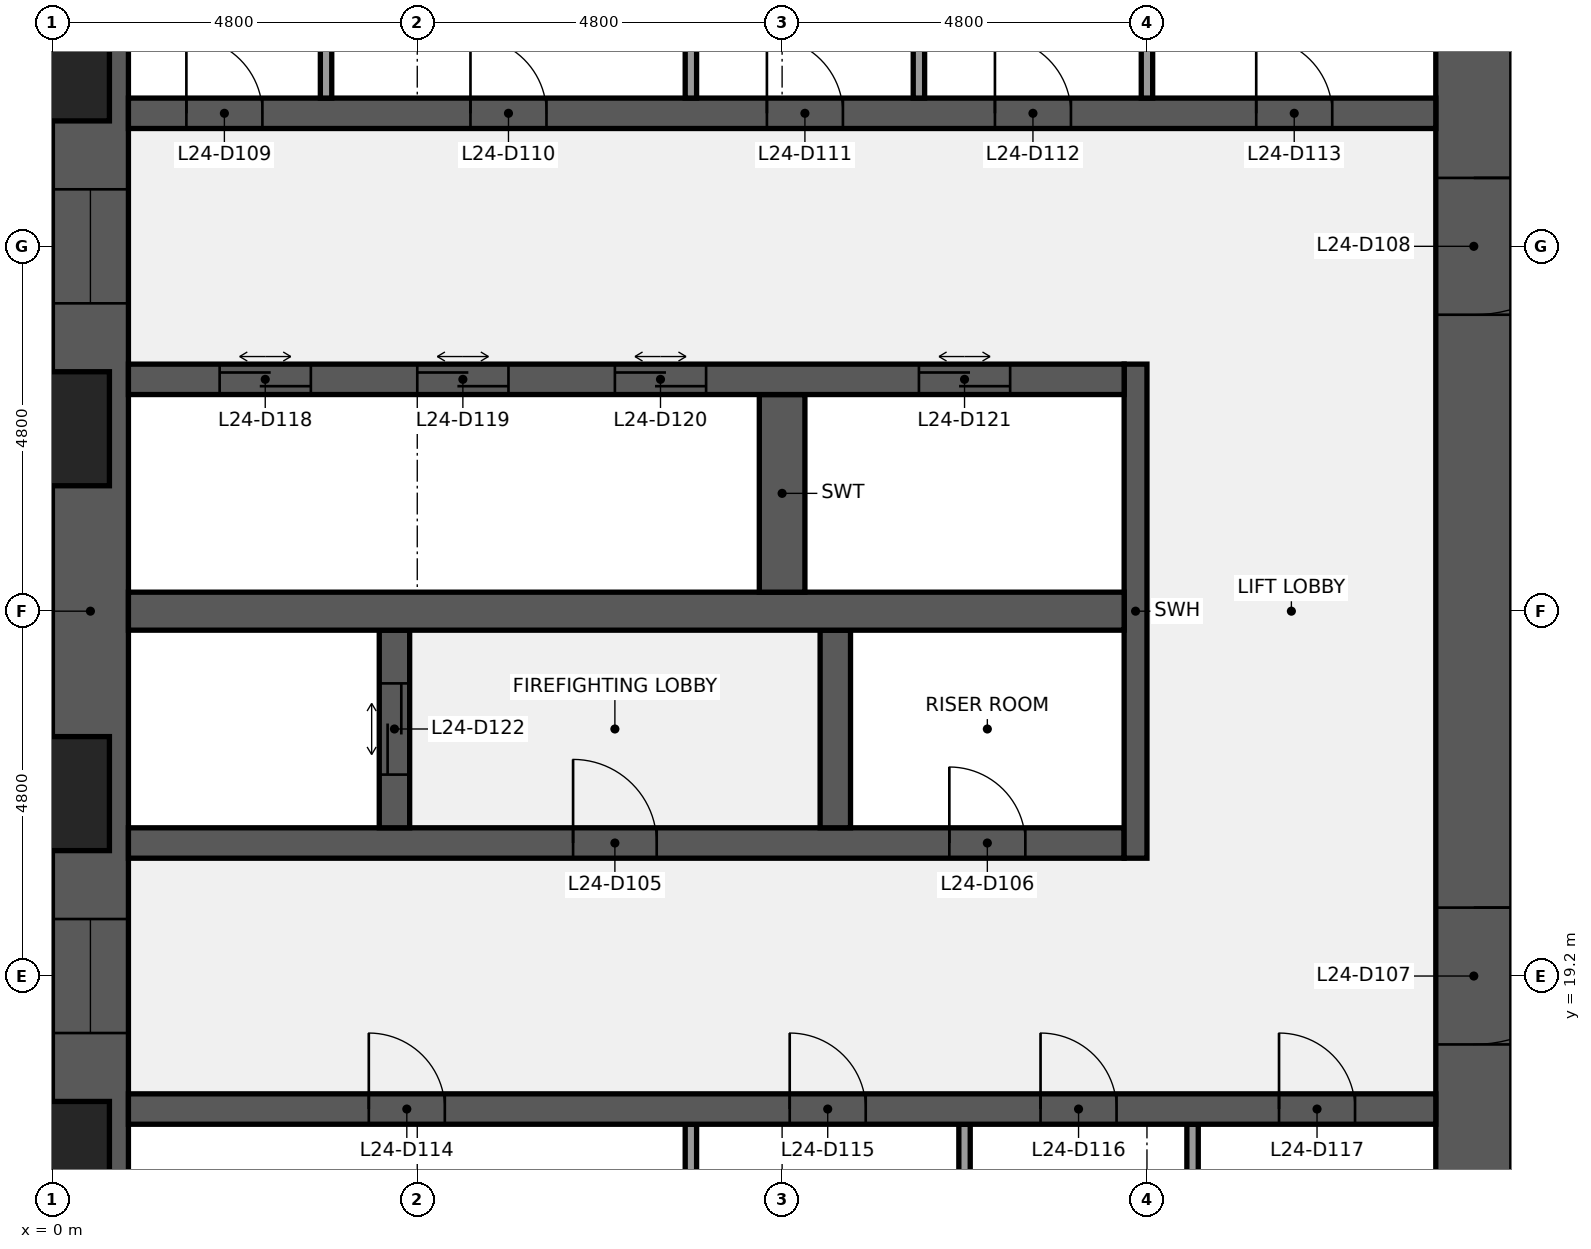
"""IFC4 building model, lengths in metres.
Left out: names, types, materials, properties, quantities, classifications, styles, units other than length and angle.
Written with IfcOpenShell. Run it as: python <this file> out.ifc"""

import sys

from ifc_helpers import new_model, si_unit, direction, frame, frame_2d, origin, place, context, subcontext, project, spatial, rectangle, extrude, element, fill, save


model = new_model("IFC4")
c1 = context("Model", 3, precision=1e-05, world=origin(), true_north=direction((0.0, 1.0)))
c2 = subcontext(c1, "Body", "Model", "MODEL_VIEW")
j1 = project(units=[si_unit("LENGTHUNIT", "METRE"), si_unit("PLANEANGLEUNIT", "RADIAN")], contexts=[c1])
p1 = place(None, origin())
s1 = spatial("IfcSite", under=j1, at=p1, CompositionType="ELEMENT")
p2 = place(p1, origin())
s2 = spatial("IfcBuilding", under=s1, at=p2, CompositionType="ELEMENT")
p3 = place(p2, frame((0.0, 0.0, 116.1)))
s3 = spatial("IfcBuildingStorey", under=s2, at=p3, CompositionType="ELEMENT", Elevation=116.1)
p4 = place(p3, frame((0.5, 9.6, 0.0), z_axis=(0.0, 0.0, 1.0), x_axis=(0.0, 1.0, 0.0)))
e1 = element("IfcWall", 1, at=p4, inside=s3, PredefinedType="SHEAR", context=c2, shape_type="SweptSolid", body=[
    extrude(rectangle(XDim=28.8, YDim=1.0, at=frame_2d((14.4, 0.0))), origin(), (0.0, 0.0, 1.0), 3.84),
])
p5 = place(p4, frame((8.85, 0.0, 0.9)))
e2 = element("IfcOpeningElement", 2, at=p5, cuts=e1, PredefinedType="OPENING", context=c2, shape_type="SweptSolid", body=[
    extrude(rectangle(XDim=1.5, YDim=1.5, at=frame_2d((0.75, 0.75))), frame((0.0, 0.51, 0.0), z_axis=(0.0, -1.0, 0.0), x_axis=(1.0, 0.0, 0.0)), (0.0, 0.0, 1.0), 1.02),
])
p6 = place(p4, frame((18.45, 0.0, 0.9)))
e3 = element("IfcOpeningElement", 3, at=p6, cuts=e1, PredefinedType="OPENING", context=c2, shape_type="SweptSolid", body=[
    extrude(rectangle(XDim=1.5, YDim=1.5, at=frame_2d((0.75, 0.75))), frame((0.0, 0.51, 0.0), z_axis=(0.0, -1.0, 0.0), x_axis=(1.0, 0.0, 0.0)), (0.0, 0.0, 1.0), 1.02),
])
p7 = place(p3, frame((18.7, 38.4, 0.0), z_axis=(0.0, 0.0, 1.0), x_axis=(0.0, -1.0, 0.0)))
e4 = element("IfcWall", 4, at=p7, inside=s3, PredefinedType="SHEAR", context=c2, shape_type="SweptSolid", body=[
    extrude(rectangle(XDim=28.8, YDim=1.0, at=frame_2d((14.4, 0.0))), origin(), (0.0, 0.0, 1.0), 3.84),
])
p8 = place(p7, frame((18.3, 0.0, 0.0)))
e5 = element("IfcOpeningElement", 5, at=p8, cuts=e4, PredefinedType="OPENING", context=c2, shape_type="SweptSolid", body=[
    extrude(rectangle(XDim=1.8, YDim=2.1, at=frame_2d((0.9, 1.05))), frame((0.0, 0.51, 0.0), z_axis=(0.0, -1.0, 0.0), x_axis=(1.0, 0.0, 0.0)), (0.0, 0.0, 1.0), 1.02),
])
p9 = place(p7, frame((8.7, 0.0, 0.0)))
e6 = element("IfcOpeningElement", 6, at=p9, cuts=e4, PredefinedType="OPENING", context=c2, shape_type="SweptSolid", body=[
    extrude(rectangle(XDim=1.8, YDim=2.1, at=frame_2d((0.9, 1.05))), frame((0.0, 0.51, 0.0), z_axis=(0.0, -1.0, 0.0), x_axis=(1.0, 0.0, 0.0)), (0.0, 0.0, 1.0), 1.02),
])
for number, where, z_axis, x_axis in (
    (7, (8.4, 14.65, 0.0), (0.0, 0.0, 1.0), (0.0, 1.0, 0.0)),
    (8, (12.0, 14.65, 0.0), (0.0, 0.0, 1.0), (0.0, 1.0, 0.0)),
    (9, (15.0, 14.65, 0.0), (0.0, 0.0, 1.0), (0.0, 1.0, 0.0)),
):
    element("IfcWall", number, at=place(p3, frame(where, z_axis=z_axis, x_axis=x_axis)), inside=s3, PredefinedType="PARTITIONING", context=c2, shape_type="SweptSolid", body=[
        extrude(rectangle(XDim=2.6, YDim=0.15, at=frame_2d((1.3, 0.0))), origin(), (0.0, 0.0, 1.0), 3.84),
    ])
p10 = place(p3, frame((1.0, 17.45, 0.0), z_axis=(0.0, 0.0, 1.0), x_axis=(1.0, 0.0, 0.0)))
e10 = element("IfcWall", 10, at=p10, inside=s3, PredefinedType="SHEAR", context=c2, shape_type="SweptSolid", body=[
    extrude(rectangle(XDim=17.2, YDim=0.4, at=frame_2d((8.6, 0.0))), origin(), (0.0, 0.0, 1.0), 3.84),
])
p11 = place(p10, frame((3.163, 0.0, 0.0)))
e11 = element("IfcOpeningElement", 11, at=p11, cuts=e10, PredefinedType="OPENING", context=c2, shape_type="SweptSolid", body=[
    extrude(rectangle(XDim=1.0, YDim=2.1, at=frame_2d((0.5, 1.05))), frame((0.0, 0.21, 0.0), z_axis=(0.0, -1.0, 0.0), x_axis=(1.0, 0.0, 0.0)), (0.0, 0.0, 1.0), 0.42),
])
p12 = place(p10, frame((8.7, 0.0, 0.0)))
e12 = element("IfcOpeningElement", 12, at=p12, cuts=e10, PredefinedType="OPENING", context=c2, shape_type="SweptSolid", body=[
    extrude(rectangle(XDim=1.0, YDim=2.1, at=frame_2d((0.5, 1.05))), frame((0.0, 0.21, 0.0), z_axis=(0.0, -1.0, 0.0), x_axis=(1.0, 0.0, 0.0)), (0.0, 0.0, 1.0), 0.42),
])
p13 = place(p10, frame((12.0, 0.0, 0.0)))
e13 = element("IfcOpeningElement", 13, at=p13, cuts=e10, PredefinedType="OPENING", context=c2, shape_type="SweptSolid", body=[
    extrude(rectangle(XDim=1.0, YDim=2.1, at=frame_2d((0.5, 1.05))), frame((0.0, 0.21, 0.0), z_axis=(0.0, -1.0, 0.0), x_axis=(1.0, 0.0, 0.0)), (0.0, 0.0, 1.0), 0.42),
])
p14 = place(p10, frame((15.137, 0.0, 0.0)))
e14 = element("IfcOpeningElement", 14, at=p14, cuts=e10, PredefinedType="OPENING", context=c2, shape_type="SweptSolid", body=[
    extrude(rectangle(XDim=1.0, YDim=2.1, at=frame_2d((0.5, 1.05))), frame((0.0, 0.21, 0.0), z_axis=(0.0, -1.0, 0.0), x_axis=(1.0, 0.0, 0.0)), (0.0, 0.0, 1.0), 0.42),
])
p15 = place(p3, frame((1.0, 20.95, 0.0), z_axis=(0.0, 0.0, 1.0), x_axis=(1.0, 0.0, 0.0)))
e15 = element("IfcWall", 15, at=p15, inside=s3, PredefinedType="SHEAR", context=c2, shape_type="SweptSolid", body=[
    extrude(rectangle(XDim=13.1, YDim=0.4, at=frame_2d((6.55, 0.0))), origin(), (0.0, 0.0, 1.0), 3.84),
])
p16 = place(p15, frame((5.85, 0.0, 0.0)))
e16 = element("IfcOpeningElement", 16, at=p16, cuts=e15, PredefinedType="OPENING", context=c2, shape_type="SweptSolid", body=[
    extrude(rectangle(XDim=1.1, YDim=2.1, at=frame_2d((0.55, 1.05))), frame((0.0, 0.21, 0.0), z_axis=(0.0, -1.0, 0.0), x_axis=(1.0, 0.0, 0.0)), (0.0, 0.0, 1.0), 0.42),
])
p17 = place(p15, frame((10.8, 0.0, 0.0)))
e17 = element("IfcOpeningElement", 17, at=p17, cuts=e15, PredefinedType="OPENING", context=c2, shape_type="SweptSolid", body=[
    extrude(rectangle(XDim=1.0, YDim=2.1, at=frame_2d((0.5, 1.05))), frame((0.0, 0.21, 0.0), z_axis=(0.0, -1.0, 0.0), x_axis=(1.0, 0.0, 0.0)), (0.0, 0.0, 1.0), 0.42),
])
p18 = place(p3, frame((14.25, 20.75, 0.0), z_axis=(0.0, 0.0, 1.0), x_axis=(0.0, 1.0, 0.0)))
e18 = element("IfcWall", 18, at=p18, inside=s3, PredefinedType="SHEAR", context=c2, shape_type="SweptSolid", body=[
    extrude(rectangle(XDim=6.5, YDim=0.3, at=frame_2d((3.25, 0.0))), origin(), (0.0, 0.0, 1.0), 3.84),
])
p19 = place(p3, frame((4.5, 21.15, 0.0), z_axis=(0.0, 0.0, 1.0), x_axis=(0.0, 1.0, 0.0)))
e19 = element("IfcWall", 19, at=p19, inside=s3, PredefinedType="SHEAR", context=c2, shape_type="SweptSolid", body=[
    extrude(rectangle(XDim=2.6, YDim=0.4, at=frame_2d((1.3, 0.0))), origin(), (0.0, 0.0, 1.0), 3.84),
])
p20 = place(p19, frame((0.7, 0.0, 0.0)))
e20 = element("IfcOpeningElement", 20, at=p20, cuts=e19, PredefinedType="OPENING", context=c2, shape_type="SweptSolid", body=[
    extrude(rectangle(XDim=1.2, YDim=2.1, at=frame_2d((0.6, 1.05))), frame((0.0, 0.21, 0.0), z_axis=(0.0, -1.0, 0.0), x_axis=(1.0, 0.0, 0.0)), (0.0, 0.0, 1.0), 0.42),
])
p21 = place(p3, frame((10.3, 21.15, 0.0), z_axis=(0.0, 0.0, 1.0), x_axis=(0.0, 1.0, 0.0)))
e21 = element("IfcWall", 21, at=p21, inside=s3, PredefinedType="SHEAR", context=c2, shape_type="SweptSolid", body=[
    extrude(rectangle(XDim=2.6, YDim=0.4, at=frame_2d((1.3, 0.0))), origin(), (0.0, 0.0, 1.0), 3.84),
])
p22 = place(p3, frame((1.0, 24.0, 0.0), z_axis=(0.0, 0.0, 1.0), x_axis=(1.0, 0.0, 0.0)))
e22 = element("IfcWall", 22, at=p22, inside=s3, PredefinedType="SHEAR", context=c2, shape_type="SweptSolid", body=[
    extrude(rectangle(XDim=13.1, YDim=0.5, at=frame_2d((6.55, 0.0))), origin(), (0.0, 0.0, 1.0), 3.84),
])
p23 = place(p3, frame((9.6, 24.25, 0.0), z_axis=(0.0, 0.0, 1.0), x_axis=(0.0, 1.0, 0.0)))
e23 = element("IfcWall", 23, at=p23, inside=s3, PredefinedType="SHEAR", context=c2, shape_type="SweptSolid", body=[
    extrude(rectangle(XDim=2.6, YDim=0.6, at=frame_2d((1.3, 0.0))), origin(), (0.0, 0.0, 1.0), 3.84),
])
p24 = place(p3, frame((1.0, 27.05, 0.0), z_axis=(0.0, 0.0, 1.0), x_axis=(1.0, 0.0, 0.0)))
e24 = element("IfcWall", 24, at=p24, inside=s3, PredefinedType="SHEAR", context=c2, shape_type="SweptSolid", body=[
    extrude(rectangle(XDim=13.1, YDim=0.4, at=frame_2d((6.55, 0.0))), origin(), (0.0, 0.0, 1.0), 3.84),
])
p25 = place(p24, frame((1.2, 0.0, 0.0)))
e25 = element("IfcOpeningElement", 25, at=p25, cuts=e24, PredefinedType="OPENING", context=c2, shape_type="SweptSolid", body=[
    extrude(rectangle(XDim=1.2, YDim=2.1, at=frame_2d((0.6, 1.05))), frame((0.0, 0.21, 0.0), z_axis=(0.0, -1.0, 0.0), x_axis=(1.0, 0.0, 0.0)), (0.0, 0.0, 1.0), 0.42),
])
p26 = place(p24, frame((3.8, 0.0, 0.0)))
e26 = element("IfcOpeningElement", 26, at=p26, cuts=e24, PredefinedType="OPENING", context=c2, shape_type="SweptSolid", body=[
    extrude(rectangle(XDim=1.2, YDim=2.1, at=frame_2d((0.6, 1.05))), frame((0.0, 0.21, 0.0), z_axis=(0.0, -1.0, 0.0), x_axis=(1.0, 0.0, 0.0)), (0.0, 0.0, 1.0), 0.42),
])
p27 = place(p24, frame((6.4, 0.0, 0.0)))
e27 = element("IfcOpeningElement", 27, at=p27, cuts=e24, PredefinedType="OPENING", context=c2, shape_type="SweptSolid", body=[
    extrude(rectangle(XDim=1.2, YDim=2.1, at=frame_2d((0.6, 1.05))), frame((0.0, 0.21, 0.0), z_axis=(0.0, -1.0, 0.0), x_axis=(1.0, 0.0, 0.0)), (0.0, 0.0, 1.0), 0.42),
])
p28 = place(p24, frame((10.4, 0.0, 0.0)))
e28 = element("IfcOpeningElement", 28, at=p28, cuts=e24, PredefinedType="OPENING", context=c2, shape_type="SweptSolid", body=[
    extrude(rectangle(XDim=1.2, YDim=2.1, at=frame_2d((0.6, 1.05))), frame((0.0, 0.21, 0.0), z_axis=(0.0, -1.0, 0.0), x_axis=(1.0, 0.0, 0.0)), (0.0, 0.0, 1.0), 0.42),
])
p29 = place(p3, frame((1.0, 30.55, 0.0), z_axis=(0.0, 0.0, 1.0), x_axis=(1.0, 0.0, 0.0)))
e29 = element("IfcWall", 29, at=p29, inside=s3, PredefinedType="SHEAR", context=c2, shape_type="SweptSolid", body=[
    extrude(rectangle(XDim=17.2, YDim=0.4, at=frame_2d((8.6, 0.0))), origin(), (0.0, 0.0, 1.0), 3.84),
])
p30 = place(p29, frame((0.762, 0.0, 0.0)))
e30 = element("IfcOpeningElement", 30, at=p30, cuts=e29, PredefinedType="OPENING", context=c2, shape_type="SweptSolid", body=[
    extrude(rectangle(XDim=1.0, YDim=2.1, at=frame_2d((0.5, 1.05))), frame((0.0, 0.21, 0.0), z_axis=(0.0, -1.0, 0.0), x_axis=(1.0, 0.0, 0.0)), (0.0, 0.0, 1.0), 0.42),
])
p31 = place(p29, frame((4.5, 0.0, 0.0)))
e31 = element("IfcOpeningElement", 31, at=p31, cuts=e29, PredefinedType="OPENING", context=c2, shape_type="SweptSolid", body=[
    extrude(rectangle(XDim=1.0, YDim=2.1, at=frame_2d((0.5, 1.05))), frame((0.0, 0.21, 0.0), z_axis=(0.0, -1.0, 0.0), x_axis=(1.0, 0.0, 0.0)), (0.0, 0.0, 1.0), 0.42),
])
p32 = place(p29, frame((8.4, 0.0, 0.0)))
e32 = element("IfcOpeningElement", 32, at=p32, cuts=e29, PredefinedType="OPENING", context=c2, shape_type="SweptSolid", body=[
    extrude(rectangle(XDim=1.0, YDim=2.1, at=frame_2d((0.5, 1.05))), frame((0.0, 0.21, 0.0), z_axis=(0.0, -1.0, 0.0), x_axis=(1.0, 0.0, 0.0)), (0.0, 0.0, 1.0), 0.42),
])
p33 = place(p29, frame((11.4, 0.0, 0.0)))
e33 = element("IfcOpeningElement", 33, at=p33, cuts=e29, PredefinedType="OPENING", context=c2, shape_type="SweptSolid", body=[
    extrude(rectangle(XDim=1.0, YDim=2.1, at=frame_2d((0.5, 1.05))), frame((0.0, 0.21, 0.0), z_axis=(0.0, -1.0, 0.0), x_axis=(1.0, 0.0, 0.0)), (0.0, 0.0, 1.0), 0.42),
])
p34 = place(p29, frame((14.837, 0.0, 0.0)))
e34 = element("IfcOpeningElement", 34, at=p34, cuts=e29, PredefinedType="OPENING", context=c2, shape_type="SweptSolid", body=[
    extrude(rectangle(XDim=1.0, YDim=2.1, at=frame_2d((0.5, 1.05))), frame((0.0, 0.21, 0.0), z_axis=(0.0, -1.0, 0.0), x_axis=(1.0, 0.0, 0.0)), (0.0, 0.0, 1.0), 0.42),
])
for number, where, z_axis, x_axis in (
    (35, (3.6, 30.75, 0.0), (0.0, 0.0, 1.0), (0.0, 1.0, 0.0)),
    (36, (8.4, 30.75, 0.0), (0.0, 0.0, 1.0), (0.0, 1.0, 0.0)),
    (37, (11.4, 30.75, 0.0), (0.0, 0.0, 1.0), (0.0, 1.0, 0.0)),
    (38, (14.4, 30.75, 0.0), (0.0, 0.0, 1.0), (0.0, 1.0, 0.0)),
):
    element("IfcWall", number, at=place(p3, frame(where, z_axis=z_axis, x_axis=x_axis)), inside=s3, PredefinedType="PARTITIONING", context=c2, shape_type="SweptSolid", body=[
        extrude(rectangle(XDim=2.6, YDim=0.15, at=frame_2d((1.3, 0.0))), origin(), (0.0, 0.0, 1.0), 3.84),
    ])
p35 = place(p16, origin())
e39 = element("IfcDoor", 39, at=p35, inside=s3, OperationType="SINGLE_SWING_LEFT", PredefinedType="DOOR", context=c2, shape_type="SweptSolid", body=[
    extrude(rectangle(XDim=1.1, YDim=2.1, at=frame_2d((0.55, 1.05))), frame((0.0, 0.025, 0.0), z_axis=(0.0, -1.0, 0.0), x_axis=(1.0, 0.0, 0.0)), (0.0, 0.0, 1.0), 0.05),
])
fill(e16, e39)
p36 = place(p17, origin())
e40 = element("IfcDoor", 40, at=p36, inside=s3, OperationType="SINGLE_SWING_LEFT", PredefinedType="DOOR", context=c2, shape_type="SweptSolid", body=[
    extrude(rectangle(XDim=1.0, YDim=2.1, at=frame_2d((0.5, 1.05))), frame((0.0, 0.025, 0.0), z_axis=(0.0, -1.0, 0.0), x_axis=(1.0, 0.0, 0.0)), (0.0, 0.0, 1.0), 0.05),
])
fill(e17, e40)
p37 = place(p8, origin())
e41 = element("IfcDoor", 41, at=p37, inside=s3, OperationType="DOUBLE_DOOR_SINGLE_SWING", PredefinedType="DOOR", context=c2, shape_type="SweptSolid", body=[
    extrude(rectangle(XDim=1.8, YDim=2.1, at=frame_2d((0.9, 1.05))), frame((0.0, 0.025, 0.0), z_axis=(0.0, -1.0, 0.0), x_axis=(1.0, 0.0, 0.0)), (0.0, 0.0, 1.0), 0.05),
])
fill(e5, e41)
p38 = place(p9, origin())
e42 = element("IfcDoor", 42, at=p38, inside=s3, OperationType="DOUBLE_DOOR_SINGLE_SWING", PredefinedType="DOOR", context=c2, shape_type="SweptSolid", body=[
    extrude(rectangle(XDim=1.8, YDim=2.1, at=frame_2d((0.9, 1.05))), frame((0.0, 0.025, 0.0), z_axis=(0.0, -1.0, 0.0), x_axis=(1.0, 0.0, 0.0)), (0.0, 0.0, 1.0), 0.05),
])
fill(e6, e42)
p39 = place(p30, origin())
e43 = element("IfcDoor", 43, at=p39, inside=s3, OperationType="SINGLE_SWING_LEFT", PredefinedType="DOOR", context=c2, shape_type="SweptSolid", body=[
    extrude(rectangle(XDim=1.0, YDim=2.1, at=frame_2d((0.5, 1.05))), frame((0.0, 0.025, 0.0), z_axis=(0.0, -1.0, 0.0), x_axis=(1.0, 0.0, 0.0)), (0.0, 0.0, 1.0), 0.05),
])
fill(e30, e43)
p40 = place(p31, origin())
e44 = element("IfcDoor", 44, at=p40, inside=s3, OperationType="SINGLE_SWING_LEFT", PredefinedType="DOOR", context=c2, shape_type="SweptSolid", body=[
    extrude(rectangle(XDim=1.0, YDim=2.1, at=frame_2d((0.5, 1.05))), frame((0.0, 0.025, 0.0), z_axis=(0.0, -1.0, 0.0), x_axis=(1.0, 0.0, 0.0)), (0.0, 0.0, 1.0), 0.05),
])
fill(e31, e44)
p41 = place(p32, origin())
e45 = element("IfcDoor", 45, at=p41, inside=s3, OperationType="SINGLE_SWING_LEFT", PredefinedType="DOOR", context=c2, shape_type="SweptSolid", body=[
    extrude(rectangle(XDim=1.0, YDim=2.1, at=frame_2d((0.5, 1.05))), frame((0.0, 0.025, 0.0), z_axis=(0.0, -1.0, 0.0), x_axis=(1.0, 0.0, 0.0)), (0.0, 0.0, 1.0), 0.05),
])
fill(e32, e45)
p42 = place(p33, origin())
e46 = element("IfcDoor", 46, at=p42, inside=s3, OperationType="SINGLE_SWING_LEFT", PredefinedType="DOOR", context=c2, shape_type="SweptSolid", body=[
    extrude(rectangle(XDim=1.0, YDim=2.1, at=frame_2d((0.5, 1.05))), frame((0.0, 0.025, 0.0), z_axis=(0.0, -1.0, 0.0), x_axis=(1.0, 0.0, 0.0)), (0.0, 0.0, 1.0), 0.05),
])
fill(e33, e46)
p43 = place(p34, origin())
e47 = element("IfcDoor", 47, at=p43, inside=s3, OperationType="SINGLE_SWING_LEFT", PredefinedType="DOOR", context=c2, shape_type="SweptSolid", body=[
    extrude(rectangle(XDim=1.0, YDim=2.1, at=frame_2d((0.5, 1.05))), frame((0.0, 0.025, 0.0), z_axis=(0.0, -1.0, 0.0), x_axis=(1.0, 0.0, 0.0)), (0.0, 0.0, 1.0), 0.05),
])
fill(e34, e47)
p44 = place(p11, origin())
e48 = element("IfcDoor", 48, at=p44, inside=s3, OperationType="SINGLE_SWING_LEFT", PredefinedType="DOOR", context=c2, shape_type="SweptSolid", body=[
    extrude(rectangle(XDim=1.0, YDim=2.1, at=frame_2d((0.5, 1.05))), frame((0.0, 0.025, 0.0), z_axis=(0.0, -1.0, 0.0), x_axis=(1.0, 0.0, 0.0)), (0.0, 0.0, 1.0), 0.05),
])
fill(e11, e48)
p45 = place(p12, origin())
e49 = element("IfcDoor", 49, at=p45, inside=s3, OperationType="SINGLE_SWING_LEFT", PredefinedType="DOOR", context=c2, shape_type="SweptSolid", body=[
    extrude(rectangle(XDim=1.0, YDim=2.1, at=frame_2d((0.5, 1.05))), frame((0.0, 0.025, 0.0), z_axis=(0.0, -1.0, 0.0), x_axis=(1.0, 0.0, 0.0)), (0.0, 0.0, 1.0), 0.05),
])
fill(e12, e49)
p46 = place(p13, origin())
e50 = element("IfcDoor", 50, at=p46, inside=s3, OperationType="SINGLE_SWING_LEFT", PredefinedType="DOOR", context=c2, shape_type="SweptSolid", body=[
    extrude(rectangle(XDim=1.0, YDim=2.1, at=frame_2d((0.5, 1.05))), frame((0.0, 0.025, 0.0), z_axis=(0.0, -1.0, 0.0), x_axis=(1.0, 0.0, 0.0)), (0.0, 0.0, 1.0), 0.05),
])
fill(e13, e50)
p47 = place(p14, origin())
e51 = element("IfcDoor", 51, at=p47, inside=s3, OperationType="SINGLE_SWING_LEFT", PredefinedType="DOOR", context=c2, shape_type="SweptSolid", body=[
    extrude(rectangle(XDim=1.0, YDim=2.1, at=frame_2d((0.5, 1.05))), frame((0.0, 0.025, 0.0), z_axis=(0.0, -1.0, 0.0), x_axis=(1.0, 0.0, 0.0)), (0.0, 0.0, 1.0), 0.05),
])
fill(e14, e51)
p48 = place(p25, origin())
e52 = element("IfcDoor", 52, at=p48, inside=s3, OperationType="DOUBLE_DOOR_SLIDING", PredefinedType="DOOR", context=c2, shape_type="SweptSolid", body=[
    extrude(rectangle(XDim=1.2, YDim=2.1, at=frame_2d((0.6, 1.05))), frame((0.0, 0.025, 0.0), z_axis=(0.0, -1.0, 0.0), x_axis=(1.0, 0.0, 0.0)), (0.0, 0.0, 1.0), 0.05),
])
fill(e25, e52)
p49 = place(p26, origin())
e53 = element("IfcDoor", 53, at=p49, inside=s3, OperationType="DOUBLE_DOOR_SLIDING", PredefinedType="DOOR", context=c2, shape_type="SweptSolid", body=[
    extrude(rectangle(XDim=1.2, YDim=2.1, at=frame_2d((0.6, 1.05))), frame((0.0, 0.025, 0.0), z_axis=(0.0, -1.0, 0.0), x_axis=(1.0, 0.0, 0.0)), (0.0, 0.0, 1.0), 0.05),
])
fill(e26, e53)
p50 = place(p27, origin())
e54 = element("IfcDoor", 54, at=p50, inside=s3, OperationType="DOUBLE_DOOR_SLIDING", PredefinedType="DOOR", context=c2, shape_type="SweptSolid", body=[
    extrude(rectangle(XDim=1.2, YDim=2.1, at=frame_2d((0.6, 1.05))), frame((0.0, 0.025, 0.0), z_axis=(0.0, -1.0, 0.0), x_axis=(1.0, 0.0, 0.0)), (0.0, 0.0, 1.0), 0.05),
])
fill(e27, e54)
p51 = place(p28, origin())
e55 = element("IfcDoor", 55, at=p51, inside=s3, OperationType="DOUBLE_DOOR_SLIDING", PredefinedType="DOOR", context=c2, shape_type="SweptSolid", body=[
    extrude(rectangle(XDim=1.2, YDim=2.1, at=frame_2d((0.6, 1.05))), frame((0.0, 0.025, 0.0), z_axis=(0.0, -1.0, 0.0), x_axis=(1.0, 0.0, 0.0)), (0.0, 0.0, 1.0), 0.05),
])
fill(e28, e55)
p52 = place(p20, origin())
e56 = element("IfcDoor", 56, at=p52, inside=s3, OperationType="DOUBLE_DOOR_SLIDING", PredefinedType="DOOR", context=c2, shape_type="SweptSolid", body=[
    extrude(rectangle(XDim=1.2, YDim=2.1, at=frame_2d((0.6, 1.05))), frame((0.0, 0.025, 0.0), z_axis=(0.0, -1.0, 0.0), x_axis=(1.0, 0.0, 0.0)), (0.0, 0.0, 1.0), 0.05),
])
fill(e20, e56)
p53 = place(p5, origin())
e57 = element("IfcWindow", 57, at=p53, inside=s3, PartitioningType="SINGLE_PANEL", PredefinedType="WINDOW", context=c2, shape_type="SweptSolid", body=[
    extrude(rectangle(XDim=1.5, YDim=1.5, at=frame_2d((0.75, 0.75))), frame((0.0, 0.03, 0.0), z_axis=(0.0, -1.0, 0.0), x_axis=(1.0, 0.0, 0.0)), (0.0, 0.0, 1.0), 0.06),
])
fill(e2, e57)
p54 = place(p6, origin())
e58 = element("IfcWindow", 58, at=p54, inside=s3, PartitioningType="SINGLE_PANEL", PredefinedType="WINDOW", context=c2, shape_type="SweptSolid", body=[
    extrude(rectangle(XDim=1.5, YDim=1.5, at=frame_2d((0.75, 0.75))), frame((0.0, 0.03, 0.0), z_axis=(0.0, -1.0, 0.0), x_axis=(1.0, 0.0, 0.0)), (0.0, 0.0, 1.0), 0.06),
])
fill(e3, e58)
save(model, sys.argv[1])
